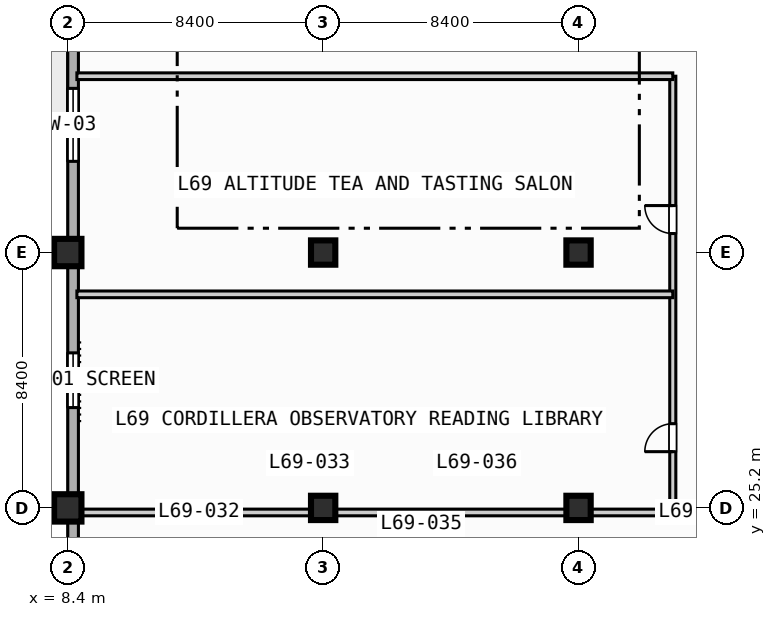
"""IFC4 building model, lengths in metres.
Left out: names, types, materials, properties, quantities, classifications, styles, units other than length and angle.
Written with IfcOpenShell. Run it as: python <this file> out.ifc"""

import sys

from ifc_helpers import new_model, si_unit, direction, frame, frame_2d, origin, origin_2d, place, context, subcontext, project, spatial, rectangle, extrude, element, fill, save


model = new_model("IFC4")
c1 = context("Model", 3, precision=1e-05, world=origin(), true_north=direction((0.0, 1.0)))
c2 = subcontext(c1, "Body", "Model", "MODEL_VIEW")
j1 = project(units=[si_unit("LENGTHUNIT", "METRE"), si_unit("PLANEANGLEUNIT", "RADIAN")], contexts=[c1])
p1 = place(None, origin())
s1 = spatial("IfcSite", under=j1, at=p1, CompositionType="ELEMENT")
p2 = place(p1, origin())
s2 = spatial("IfcBuilding", under=s1, at=p2, CompositionType="ELEMENT")
p3 = place(p2, frame((0.0, 0.0, 278.6)))
s3 = spatial("IfcBuildingStorey", under=s2, at=p3, CompositionType="ELEMENT", Elevation=278.6)
for number, where, z_axis, x_axis in (
    (1, (8.4, 25.2, 0.0), (0.0, 0.0, 1.0), (1.0, 0.0, 0.0)),
    (2, (8.4, 33.6, 0.0), (0.0, 0.0, 1.0), (1.0, 0.0, 0.0)),
):
    element("IfcColumn", number, at=place(p3, frame(where, z_axis=z_axis, x_axis=x_axis)), inside=s3, PredefinedType="COLUMN", context=c2, shape_type="SweptSolid", body=[
        extrude(rectangle(XDim=0.9, YDim=0.9, at=origin_2d()), origin(), (0.0, 0.0, 1.0), 3.7),
    ])
for number, where, z_axis, x_axis in (
    (3, (16.8, 25.2, 0.0), (0.0, 0.0, 1.0), (1.0, 0.0, 0.0)),
    (4, (16.8, 33.6, 0.0), (0.0, 0.0, 1.0), (1.0, 0.0, 0.0)),
    (5, (25.2, 25.2, 0.0), (0.0, 0.0, 1.0), (1.0, 0.0, 0.0)),
    (6, (25.2, 33.6, 0.0), (0.0, 0.0, 1.0), (1.0, 0.0, 0.0)),
):
    element("IfcColumn", number, at=place(p3, frame(where, z_axis=z_axis, x_axis=x_axis)), inside=s3, PredefinedType="COLUMN", context=c2, shape_type="SweptSolid", body=[
        extrude(rectangle(XDim=0.8, YDim=0.8, at=origin_2d()), origin(), (0.0, 0.0, 1.0), 3.7),
    ])
p4 = place(p3, frame((8.575, 11.575, 0.0), z_axis=(0.0, 0.0, 1.0), x_axis=(0.0, 1.0, 0.0)))
e7 = element("IfcWall", 7, at=p4, inside=s3, PredefinedType="STANDARD", context=c2, shape_type="SweptSolid", body=[
    extrude(rectangle(XDim=60.85, YDim=0.35, at=frame_2d((30.425, 0.0))), origin(), (0.0, 0.0, 1.0), 3.47),
])
p5 = place(p4, frame((33.925, 0.0, 0.0)))
e8 = element("IfcOpeningElement", 8, at=p5, cuts=e7, PredefinedType="OPENING", context=c2, shape_type="SweptSolid", body=[
    extrude(rectangle(XDim=1.4, YDim=2.2, at=frame_2d((0.7, 1.1))), frame((0.0, 0.185, 0.0), z_axis=(0.0, -1.0, 0.0), x_axis=(1.0, 0.0, 0.0)), (0.0, 0.0, 1.0), 0.37),
])
p6 = place(p4, frame((16.925, 0.0, 0.85)))
e9 = element("IfcOpeningElement", 9, at=p6, cuts=e7, PredefinedType="OPENING", context=c2, shape_type="SweptSolid", body=[
    extrude(rectangle(XDim=1.8, YDim=1.8, at=frame_2d((0.9, 0.9))), frame((0.0, 0.185, 0.0), z_axis=(0.0, -1.0, 0.0), x_axis=(1.0, 0.0, 0.0)), (0.0, 0.0, 1.0), 0.37),
])
p7 = place(p4, frame((25.025, 0.0, 0.85)))
e10 = element("IfcOpeningElement", 10, at=p7, cuts=e7, PredefinedType="OPENING", context=c2, shape_type="SweptSolid", body=[
    extrude(rectangle(XDim=2.4, YDim=1.95, at=frame_2d((1.2, 0.975))), frame((0.0, 0.185, 0.0), z_axis=(0.0, -1.0, 0.0), x_axis=(1.0, 0.0, 0.0)), (0.0, 0.0, 1.0), 0.37),
])
p8 = place(p4, frame((41.825, 0.0, 0.85)))
e11 = element("IfcOpeningElement", 11, at=p8, cuts=e7, PredefinedType="OPENING", context=c2, shape_type="SweptSolid", body=[
    extrude(rectangle(XDim=2.4, YDim=1.95, at=frame_2d((1.2, 0.975))), frame((0.0, 0.185, 0.0), z_axis=(0.0, -1.0, 0.0), x_axis=(1.0, 0.0, 0.0)), (0.0, 0.0, 1.0), 0.37),
])
p9 = place(p3, frame((28.3, 25.05, 0.0), z_axis=(0.0, 0.0, 1.0), x_axis=(0.0, 1.0, 0.0)))
e12 = element("IfcWall", 12, at=p9, inside=s3, PredefinedType="PARTITIONING", context=c2, shape_type="SweptSolid", body=[
    extrude(rectangle(XDim=14.35, YDim=0.2, at=frame_2d((7.175, 0.0))), origin(), (0.0, 0.0, 1.0), 3.47),
])
p10 = place(p9, frame((2.0, 0.0, 0.0)))
e13 = element("IfcOpeningElement", 13, at=p10, cuts=e12, PredefinedType="OPENING", context=c2, shape_type="SweptSolid", body=[
    extrude(rectangle(XDim=0.92, YDim=2.1, at=frame_2d((0.46, 1.05))), frame((0.0, 0.11, 0.0), z_axis=(0.0, -1.0, 0.0), x_axis=(1.0, 0.0, 0.0)), (0.0, 0.0, 1.0), 0.22),
])
p11 = place(p9, frame((9.175, 0.0, 0.0)))
e14 = element("IfcOpeningElement", 14, at=p11, cuts=e12, PredefinedType="OPENING", context=c2, shape_type="SweptSolid", body=[
    extrude(rectangle(XDim=0.92, YDim=2.1, at=frame_2d((0.46, 1.05))), frame((0.0, 0.11, 0.0), z_axis=(0.0, -1.0, 0.0), x_axis=(1.0, 0.0, 0.0)), (0.0, 0.0, 1.0), 0.22),
])
p12 = place(p3, frame((8.7, 25.05, 0.0), z_axis=(0.0, 0.0, 1.0), x_axis=(1.0, 0.0, 0.0)))
e15 = element("IfcWall", 15, at=p12, inside=s3, PredefinedType="PARTITIONING", context=c2, shape_type="SweptSolid", body=[
    extrude(rectangle(XDim=19.6, YDim=0.22, at=frame_2d((9.8, 0.0))), origin(), (0.0, 0.0, 1.0), 2.82),
])
for number, where, z_axis, x_axis in (
    (16, (8.7, 32.225, 0.0), (0.0, 0.0, 1.0), (1.0, 0.0, 0.0)),
    (17, (8.7, 39.4, 0.0), (0.0, 0.0, 1.0), (1.0, 0.0, 0.0)),
):
    element("IfcWall", number, at=place(p3, frame(where, z_axis=z_axis, x_axis=x_axis)), inside=s3, PredefinedType="PARTITIONING", context=c2, shape_type="SweptSolid", body=[
        extrude(rectangle(XDim=19.6, YDim=0.22, at=frame_2d((9.8, 0.0))), origin(), (0.0, 0.0, 1.0), 3.47),
    ])
p13 = place(p6, origin())
e18 = element("IfcWindow", 18, at=p13, inside=s3, PartitioningType="SINGLE_PANEL", PredefinedType="WINDOW", context=c2, shape_type="SweptSolid", body=[
    extrude(rectangle(XDim=1.8, YDim=1.8, at=frame_2d((0.9, 0.9))), frame((0.0, 0.03, 0.0), z_axis=(0.0, -1.0, 0.0), x_axis=(1.0, 0.0, 0.0)), (0.0, 0.0, 1.0), 0.06),
])
fill(e9, e18)
p14 = place(p7, origin())
e19 = element("IfcWindow", 19, at=p14, inside=s3, PartitioningType="SINGLE_PANEL", PredefinedType="WINDOW", context=c2, shape_type="SweptSolid", body=[
    extrude(rectangle(XDim=2.4, YDim=1.95, at=frame_2d((1.2, 0.975))), frame((0.0, 0.03, 0.0), z_axis=(0.0, -1.0, 0.0), x_axis=(1.0, 0.0, 0.0)), (0.0, 0.0, 1.0), 0.06),
])
fill(e10, e19)
p15 = place(p10, origin())
e20 = element("IfcDoor", 20, at=p15, inside=s3, OperationType="SINGLE_SWING_LEFT", PredefinedType="DOOR", context=c2, shape_type="SweptSolid", body=[
    extrude(rectangle(XDim=0.92, YDim=2.1, at=frame_2d((0.46, 1.05))), frame((0.0, 0.025, 0.0), z_axis=(0.0, -1.0, 0.0), x_axis=(1.0, 0.0, 0.0)), (0.0, 0.0, 1.0), 0.05),
])
fill(e13, e20)
p16 = place(p11, origin())
e21 = element("IfcDoor", 21, at=p16, inside=s3, OperationType="SINGLE_SWING_RIGHT", PredefinedType="DOOR", context=c2, shape_type="SweptSolid", body=[
    extrude(rectangle(XDim=0.92, YDim=2.1, at=frame_2d((0.46, 1.05))), frame((0.0, 0.025, 0.0), z_axis=(0.0, -1.0, 0.0), x_axis=(1.0, 0.0, 0.0)), (0.0, 0.0, 1.0), 0.05),
])
fill(e14, e21)
save(model, sys.argv[1])
